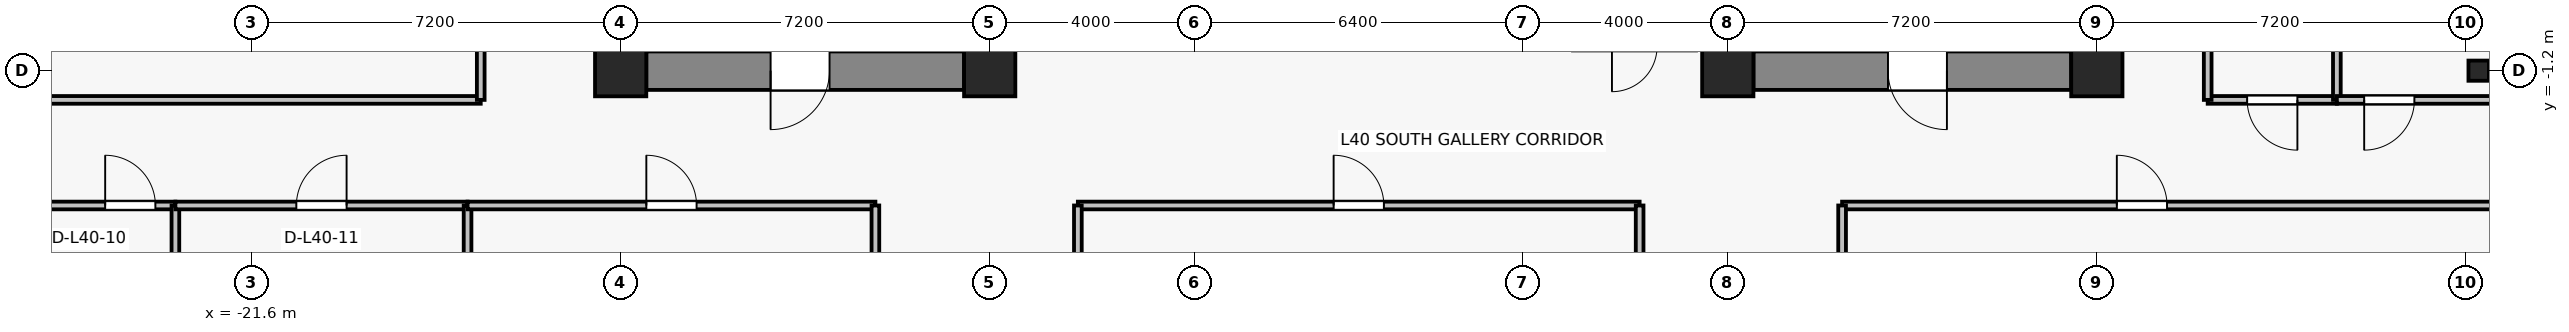
"""IFC4 building model, lengths in metres.
Left out: names, types, materials, properties, quantities, classifications, styles, units other than length and angle.
Written with IfcOpenShell. Run it as: python <this file> out.ifc"""

import sys

from ifc_helpers import new_model, si_unit, direction, frame, frame_2d, origin, origin_2d, place, context, subcontext, project, spatial, rectangle, i_section, extrude, source, transform, mapped, element, fill, save


model = new_model("IFC4")
c1 = context("Model", 3, precision=1e-05, world=origin(), true_north=direction((0.0, 1.0)))
c2 = subcontext(c1, "Body", "Model", "MODEL_VIEW")
j1 = project(units=[si_unit("LENGTHUNIT", "METRE"), si_unit("PLANEANGLEUNIT", "RADIAN")], contexts=[c1])
p1 = place(None, origin())
s1 = spatial("IfcSite", under=j1, at=p1, CompositionType="ELEMENT")
p2 = place(p1, origin())
s2 = spatial("IfcBuilding", under=s1, at=p2, CompositionType="ELEMENT")
p3 = place(p2, frame((0.0, 0.0, 146.2)))
s3 = spatial("IfcBuildingStorey", under=s2, at=p3, CompositionType="ELEMENT", Elevation=146.2)
for number, where, z_axis, x_axis in (
    (1, (-14.4, -1.2, 0.0), (0.0, 0.0, 1.0), (1.0, 0.0, 0.0)),
    (2, (-7.2, -1.2, 0.0), (0.0, 0.0, 1.0), (1.0, 0.0, 0.0)),
    (3, (7.2, -1.2, 0.0), (0.0, 0.0, 1.0), (1.0, 0.0, 0.0)),
    (4, (14.4, -1.2, 0.0), (0.0, 0.0, 1.0), (1.0, 0.0, 0.0)),
):
    element("IfcColumn", number, at=place(p3, frame(where, z_axis=z_axis, x_axis=x_axis)), inside=s3, PredefinedType="COLUMN", context=c2, shape_type="SweptSolid", body=[
        extrude(rectangle(XDim=1.0, YDim=1.0, at=origin_2d()), origin(), (0.0, 0.0, 1.0), 3.3),
    ])
p4 = place(p3, frame((21.85, -1.2, 0.0), z_axis=(0.0, 0.0, 1.0), x_axis=(1.0, 0.0, 0.0)))
e5 = element("IfcColumn", 5, at=p4, inside=s3, PredefinedType="COLUMN", context=c2, shape_type="SweptSolid", body=[
    extrude(i_section(OverallWidth=0.399, OverallDepth=0.394, WebThickness=0.023, FlangeThickness=0.037, FilletRadius=0.015, at=origin_2d()), origin(), (0.0, 0.0, 1.0), 3.3),
])
p5 = place(p3, frame((-7.7, -1.2, 0.0), z_axis=(0.0, 0.0, 1.0), x_axis=(-1.0, 0.0, 0.0)))
e6 = element("IfcWall", 6, at=p5, inside=s3, PredefinedType="SHEAR", context=c2, shape_type="SweptSolid", body=[
    extrude(rectangle(XDim=6.2, YDim=0.75, at=frame_2d((3.1, 0.0))), origin(), (0.0, 0.0, 1.0), 3.075),
])
p6 = place(p5, frame((2.625, 0.0, 0.0)))
e7 = element("IfcOpeningElement", 7, at=p6, cuts=e6, PredefinedType="OPENING", context=c2, shape_type="SweptSolid", body=[
    extrude(rectangle(XDim=1.15, YDim=2.15, at=frame_2d((0.575, 1.075))), frame((0.0, 0.385, 0.0), z_axis=(0.0, -1.0, 0.0), x_axis=(1.0, 0.0, 0.0)), (0.0, 0.0, 1.0), 0.77),
])
p7 = place(p3, frame((13.9, -1.2, 0.0), z_axis=(0.0, 0.0, 1.0), x_axis=(-1.0, 0.0, 0.0)))
e8 = element("IfcWall", 8, at=p7, inside=s3, PredefinedType="SHEAR", context=c2, shape_type="SweptSolid", body=[
    extrude(rectangle(XDim=6.2, YDim=0.75, at=frame_2d((3.1, 0.0))), origin(), (0.0, 0.0, 1.0), 3.075),
])
p8 = place(p7, frame((2.425, 0.0, 0.0)))
e9 = element("IfcOpeningElement", 9, at=p8, cuts=e8, PredefinedType="OPENING", context=c2, shape_type="SweptSolid", body=[
    extrude(rectangle(XDim=1.15, YDim=2.15, at=frame_2d((0.575, 1.075))), frame((0.0, 0.385, 0.0), z_axis=(0.0, -1.0, 0.0), x_axis=(1.0, 0.0, 0.0)), (0.0, 0.0, 1.0), 0.77),
])
p9 = place(p3, frame((-26.53, -3.83, 0.0), z_axis=(0.0, 0.0, 1.0), x_axis=(1.0, 0.0, 0.0)))
e10 = element("IfcWall", 10, at=p9, inside=s3, PredefinedType="PARTITIONING", context=c2, shape_type="SweptSolid", body=[
    extrude(rectangle(XDim=3.443, YDim=0.15, at=frame_2d((1.722, 0.0))), origin(), (0.0, 0.0, 1.0), 2.565),
])
p10 = place(p9, frame((2.073, 0.0, 0.0)))
e11 = element("IfcOpeningElement", 11, at=p10, cuts=e10, PredefinedType="OPENING", context=c2, shape_type="SweptSolid", body=[
    extrude(rectangle(XDim=0.98, YDim=2.15, at=frame_2d((0.49, 1.075))), frame((0.0, 0.085, 0.0), z_axis=(0.0, -1.0, 0.0), x_axis=(1.0, 0.0, 0.0)), (0.0, 0.0, 1.0), 0.17),
])
p11 = place(p3, frame((-23.087, -3.83, 0.0), z_axis=(0.0, 0.0, 1.0), x_axis=(0.0, -1.0, 0.0)))
e12 = element("IfcWall", 12, at=p11, inside=s3, PredefinedType="PARTITIONING", context=c2, shape_type="SweptSolid", body=[
    extrude(rectangle(XDim=8.49, YDim=0.15, at=frame_2d((4.245, 0.0))), origin(), (0.0, 0.0, 1.0), 2.565),
])
p12 = place(p3, frame((-23.087, -3.83, 0.0), z_axis=(0.0, 0.0, 1.0), x_axis=(1.0, 0.0, 0.0)))
e13 = element("IfcWall", 13, at=p12, inside=s3, PredefinedType="PARTITIONING", context=c2, shape_type="SweptSolid", body=[
    extrude(rectangle(XDim=5.7, YDim=0.15, at=frame_2d((2.85, 0.0))), origin(), (0.0, 0.0, 1.0), 3.075),
])
p13 = place(p12, frame((2.36, 0.0, 0.0)))
e14 = element("IfcOpeningElement", 14, at=p13, cuts=e13, PredefinedType="OPENING", context=c2, shape_type="SweptSolid", body=[
    extrude(rectangle(XDim=0.98, YDim=2.15, at=frame_2d((0.49, 1.075))), frame((0.0, 0.085, 0.0), z_axis=(0.0, -1.0, 0.0), x_axis=(1.0, 0.0, 0.0)), (0.0, 0.0, 1.0), 0.17),
])
p14 = place(p3, frame((-17.387, -3.83, 0.0), z_axis=(0.0, 0.0, 1.0), x_axis=(0.0, -1.0, 0.0)))
e15 = element("IfcWall", 15, at=p14, inside=s3, PredefinedType="PARTITIONING", context=c2, shape_type="SweptSolid", body=[
    extrude(rectangle(XDim=8.49, YDim=0.15, at=frame_2d((4.245, 0.0))), origin(), (0.0, 0.0, 1.0), 2.565),
])
p15 = place(p3, frame((-17.387, -3.83, 0.0), z_axis=(0.0, 0.0, 1.0), x_axis=(1.0, 0.0, 0.0)))
e16 = element("IfcWall", 16, at=p15, inside=s3, PredefinedType="PARTITIONING", context=c2, shape_type="SweptSolid", body=[
    extrude(rectangle(XDim=7.957, YDim=0.15, at=frame_2d((3.979, 0.0))), origin(), (0.0, 0.0, 1.0), 2.565),
])
p16 = place(p15, frame((3.488, 0.0, 0.0)))
e17 = element("IfcOpeningElement", 17, at=p16, cuts=e16, PredefinedType="OPENING", context=c2, shape_type="SweptSolid", body=[
    extrude(rectangle(XDim=0.98, YDim=2.15, at=frame_2d((0.49, 1.075))), frame((0.0, 0.085, 0.0), z_axis=(0.0, -1.0, 0.0), x_axis=(1.0, 0.0, 0.0)), (0.0, 0.0, 1.0), 0.17),
])
p17 = place(p3, frame((-9.43, -3.83, 0.0), z_axis=(0.0, 0.0, 1.0), x_axis=(0.0, -1.0, 0.0)))
e18 = element("IfcWall", 18, at=p17, inside=s3, PredefinedType="PARTITIONING", context=c2, shape_type="SweptSolid", body=[
    extrude(rectangle(XDim=8.49, YDim=0.15, at=frame_2d((4.245, 0.0))), origin(), (0.0, 0.0, 1.0), 2.565),
])
p18 = place(p3, frame((9.43, -3.83, 0.0), z_axis=(0.0, 0.0, 1.0), x_axis=(1.0, 0.0, 0.0)))
e19 = element("IfcWall", 19, at=p18, inside=s3, PredefinedType="PARTITIONING", context=c2, shape_type="SweptSolid", body=[
    extrude(rectangle(XDim=13.1, YDim=0.15, at=frame_2d((6.55, 0.0))), origin(), (0.0, 0.0, 1.0), 2.565),
])
p19 = place(p18, frame((5.36, 0.0, 0.0)))
e20 = element("IfcOpeningElement", 20, at=p19, cuts=e19, PredefinedType="OPENING", context=c2, shape_type="SweptSolid", body=[
    extrude(rectangle(XDim=0.98, YDim=2.15, at=frame_2d((0.49, 1.075))), frame((0.0, 0.085, 0.0), z_axis=(0.0, -1.0, 0.0), x_axis=(1.0, 0.0, 0.0)), (0.0, 0.0, 1.0), 0.17),
])
p20 = place(p3, frame((9.43, -12.32, 0.0), z_axis=(0.0, 0.0, 1.0), x_axis=(0.0, 1.0, 0.0)))
e21 = element("IfcWall", 21, at=p20, inside=s3, PredefinedType="PARTITIONING", context=c2, shape_type="SweptSolid", body=[
    extrude(rectangle(XDim=8.49, YDim=0.15, at=frame_2d((4.245, 0.0))), origin(), (0.0, 0.0, 1.0), 2.565),
])
p21 = place(p3, frame((-5.48, -3.83, 0.0), z_axis=(0.0, 0.0, 1.0), x_axis=(1.0, 0.0, 0.0)))
e22 = element("IfcWall", 22, at=p21, inside=s3, PredefinedType="PARTITIONING", context=c2, shape_type="SweptSolid", body=[
    extrude(rectangle(XDim=10.96, YDim=0.15, at=frame_2d((5.48, 0.0))), origin(), (0.0, 0.0, 1.0), 3.075),
])
p22 = place(p21, frame((4.99, 0.0, 0.0)))
e23 = element("IfcOpeningElement", 23, at=p22, cuts=e22, PredefinedType="OPENING", context=c2, shape_type="SweptSolid", body=[
    extrude(rectangle(XDim=0.98, YDim=2.15, at=frame_2d((0.49, 1.075))), frame((0.0, 0.085, 0.0), z_axis=(0.0, -1.0, 0.0), x_axis=(1.0, 0.0, 0.0)), (0.0, 0.0, 1.0), 0.17),
])
for number, where, z_axis, x_axis in (
    (24, (-5.48, -12.48, 0.0), (0.0, 0.0, 1.0), (0.0, 1.0, 0.0)),
    (25, (5.48, -3.83, 0.0), (0.0, 0.0, 1.0), (0.0, -1.0, 0.0)),
):
    element("IfcWall", number, at=place(p3, frame(where, z_axis=z_axis, x_axis=x_axis)), inside=s3, PredefinedType="PARTITIONING", context=c2, shape_type="SweptSolid", body=[
        extrude(rectangle(XDim=8.65, YDim=0.15, at=frame_2d((4.325, 0.0))), origin(), (0.0, 0.0, 1.0), 2.565),
    ])
p23 = place(p3, frame((-17.13, -1.77, 0.0), z_axis=(0.0, 0.0, 1.0), x_axis=(-1.0, 0.0, 0.0)))
e26 = element("IfcWall", 26, at=p23, inside=s3, PredefinedType="PARTITIONING", context=c2, shape_type="SweptSolid", body=[
    extrude(rectangle(XDim=9.4, YDim=0.15, at=frame_2d((4.7, 0.0))), origin(), (0.0, 0.0, 1.0), 2.565),
])
p24 = place(p3, frame((-17.13, 13.88, 0.0), z_axis=(0.0, 0.0, 1.0), x_axis=(0.0, -1.0, 0.0)))
e27 = element("IfcWall", 27, at=p24, inside=s3, PredefinedType="PARTITIONING", context=c2, shape_type="SweptSolid", body=[
    extrude(rectangle(XDim=15.65, YDim=0.15, at=frame_2d((7.825, 0.0))), origin(), (0.0, 0.0, 1.0), 2.565),
])
p25 = place(p24, frame((7.335, 0.0, 0.0)))
e28 = element("IfcOpeningElement", 28, at=p25, cuts=e27, PredefinedType="OPENING", context=c2, shape_type="SweptSolid", body=[
    extrude(rectangle(XDim=0.98, YDim=2.15, at=frame_2d((0.49, 1.075))), frame((0.0, 0.085, 0.0), z_axis=(0.0, -1.0, 0.0), x_axis=(1.0, 0.0, 0.0)), (0.0, 0.0, 1.0), 0.17),
])
p26 = place(p3, frame((19.083, -1.77, 0.0), z_axis=(0.0, 0.0, 1.0), x_axis=(-1.0, 0.0, 0.0)))
e29 = element("IfcWall", 29, at=p26, inside=s3, PredefinedType="PARTITIONING", context=c2, shape_type="SweptSolid", body=[
    extrude(rectangle(XDim=2.52, YDim=0.15, at=frame_2d((1.26, 0.0))), origin(), (0.0, 0.0, 1.0), 3.075),
])
p27 = place(p26, frame((0.77, 0.0, 0.0)))
e30 = element("IfcOpeningElement", 30, at=p27, cuts=e29, PredefinedType="OPENING", context=c2, shape_type="SweptSolid", body=[
    extrude(rectangle(XDim=0.98, YDim=2.15, at=frame_2d((0.49, 1.075))), frame((0.0, 0.085, 0.0), z_axis=(0.0, -1.0, 0.0), x_axis=(1.0, 0.0, 0.0)), (0.0, 0.0, 1.0), 0.17),
])
for number, where, z_axis, x_axis in (
    (31, (16.563, -1.77, 0.0), (0.0, 0.0, 1.0), (0.0, 1.0, 0.0)),
    (32, (19.083, 13.88, 0.0), (0.0, 0.0, 1.0), (0.0, -1.0, 0.0)),
):
    element("IfcWall", number, at=place(p3, frame(where, z_axis=z_axis, x_axis=x_axis)), inside=s3, PredefinedType="PARTITIONING", context=c2, shape_type="SweptSolid", body=[
        extrude(rectangle(XDim=15.65, YDim=0.15, at=frame_2d((7.825, 0.0))), origin(), (0.0, 0.0, 1.0), 2.565),
    ])
p28 = place(p3, frame((22.53, -1.77, 0.0), z_axis=(0.0, 0.0, 1.0), x_axis=(-1.0, 0.0, 0.0)))
e33 = element("IfcWall", 33, at=p28, inside=s3, PredefinedType="PARTITIONING", context=c2, shape_type="SweptSolid", body=[
    extrude(rectangle(XDim=3.447, YDim=0.15, at=frame_2d((1.724, 0.0))), origin(), (0.0, 0.0, 1.0), 2.565),
])
p29 = place(p28, frame((1.934, 0.0, 0.0)))
e34 = element("IfcOpeningElement", 34, at=p29, cuts=e33, PredefinedType="OPENING", context=c2, shape_type="SweptSolid", body=[
    extrude(rectangle(XDim=0.98, YDim=2.15, at=frame_2d((0.49, 1.075))), frame((0.0, 0.085, 0.0), z_axis=(0.0, -1.0, 0.0), x_axis=(1.0, 0.0, 0.0)), (0.0, 0.0, 1.0), 0.17),
])
m1 = source(origin(), c2, "Body", "SweptSolid", [
    extrude(rectangle(XDim=1.15, YDim=2.15, at=frame_2d((0.575, 1.075))), frame((0.0, 0.025, 0.0), z_axis=(0.0, -1.0, 0.0), x_axis=(1.0, 0.0, 0.0)), (0.0, 0.0, 1.0), 0.05),
])
p30 = place(p6, origin())
e35 = element("IfcDoor", 35, at=p30, inside=s3, OperationType="SINGLE_SWING_RIGHT", PredefinedType="DOOR", context=c2, shape_type="MappedRepresentation", body=[
    mapped(m1, transform((0.0, 0.0, 0.0), x_axis=(1.0, 0.0, 0.0), y_axis=(0.0, 1.0, 0.0), z_axis=(0.0, 0.0, 1.0), scale=1.0)),
])
fill(e7, e35)
p31 = place(p8, origin())
e36 = element("IfcDoor", 36, at=p31, inside=s3, OperationType="SINGLE_SWING_LEFT", PredefinedType="DOOR", context=c2, shape_type="MappedRepresentation", body=[
    mapped(m1, transform((0.0, 0.0, 0.0), x_axis=(1.0, 0.0, 0.0), y_axis=(0.0, 1.0, 0.0), z_axis=(0.0, 0.0, 1.0), scale=1.0)),
])
fill(e9, e36)
m2 = source(origin(), c2, "Body", "SweptSolid", [
    extrude(rectangle(XDim=0.98, YDim=2.15, at=frame_2d((0.49, 1.075))), frame((0.0, 0.025, 0.0), z_axis=(0.0, -1.0, 0.0), x_axis=(1.0, 0.0, 0.0)), (0.0, 0.0, 1.0), 0.05),
])
p32 = place(p10, origin())
e37 = element("IfcDoor", 37, at=p32, inside=s3, OperationType="SINGLE_SWING_LEFT", PredefinedType="DOOR", context=c2, shape_type="MappedRepresentation", body=[
    mapped(m2, transform((0.0, 0.0, 0.0), x_axis=(1.0, 0.0, 0.0), y_axis=(0.0, 1.0, 0.0), z_axis=(0.0, 0.0, 1.0), scale=1.0)),
])
fill(e11, e37)
p33 = place(p13, origin())
e38 = element("IfcDoor", 38, at=p33, inside=s3, OperationType="SINGLE_SWING_RIGHT", PredefinedType="DOOR", context=c2, shape_type="MappedRepresentation", body=[
    mapped(m2, transform((0.0, 0.0, 0.0), x_axis=(1.0, 0.0, 0.0), y_axis=(0.0, 1.0, 0.0), z_axis=(0.0, 0.0, 1.0), scale=1.0)),
])
fill(e14, e38)
p34 = place(p16, origin())
e39 = element("IfcDoor", 39, at=p34, inside=s3, OperationType="SINGLE_SWING_LEFT", PredefinedType="DOOR", context=c2, shape_type="MappedRepresentation", body=[
    mapped(m2, transform((0.0, 0.0, 0.0), x_axis=(1.0, 0.0, 0.0), y_axis=(0.0, 1.0, 0.0), z_axis=(0.0, 0.0, 1.0), scale=1.0)),
])
fill(e17, e39)
p35 = place(p19, origin())
e40 = element("IfcDoor", 40, at=p35, inside=s3, OperationType="SINGLE_SWING_LEFT", PredefinedType="DOOR", context=c2, shape_type="MappedRepresentation", body=[
    mapped(m2, transform((0.0, 0.0, 0.0), x_axis=(1.0, 0.0, 0.0), y_axis=(0.0, 1.0, 0.0), z_axis=(0.0, 0.0, 1.0), scale=1.0)),
])
fill(e20, e40)
p36 = place(p22, origin())
e41 = element("IfcDoor", 41, at=p36, inside=s3, OperationType="SINGLE_SWING_LEFT", PredefinedType="DOOR", context=c2, shape_type="MappedRepresentation", body=[
    mapped(m2, transform((0.0, 0.0, 0.0), x_axis=(1.0, 0.0, 0.0), y_axis=(0.0, 1.0, 0.0), z_axis=(0.0, 0.0, 1.0), scale=1.0)),
])
fill(e23, e41)
p37 = place(p27, origin())
e42 = element("IfcDoor", 42, at=p37, inside=s3, OperationType="SINGLE_SWING_LEFT", PredefinedType="DOOR", context=c2, shape_type="MappedRepresentation", body=[
    mapped(m2, transform((0.0, 0.0, 0.0), x_axis=(1.0, 0.0, 0.0), y_axis=(0.0, 1.0, 0.0), z_axis=(0.0, 0.0, 1.0), scale=1.0)),
])
fill(e30, e42)
p38 = place(p29, origin())
e43 = element("IfcDoor", 43, at=p38, inside=s3, OperationType="SINGLE_SWING_RIGHT", PredefinedType="DOOR", context=c2, shape_type="MappedRepresentation", body=[
    mapped(m2, transform((0.0, 0.0, 0.0), x_axis=(1.0, 0.0, 0.0), y_axis=(0.0, 1.0, 0.0), z_axis=(0.0, 0.0, 1.0), scale=1.0)),
])
fill(e34, e43)
save(model, sys.argv[1])
